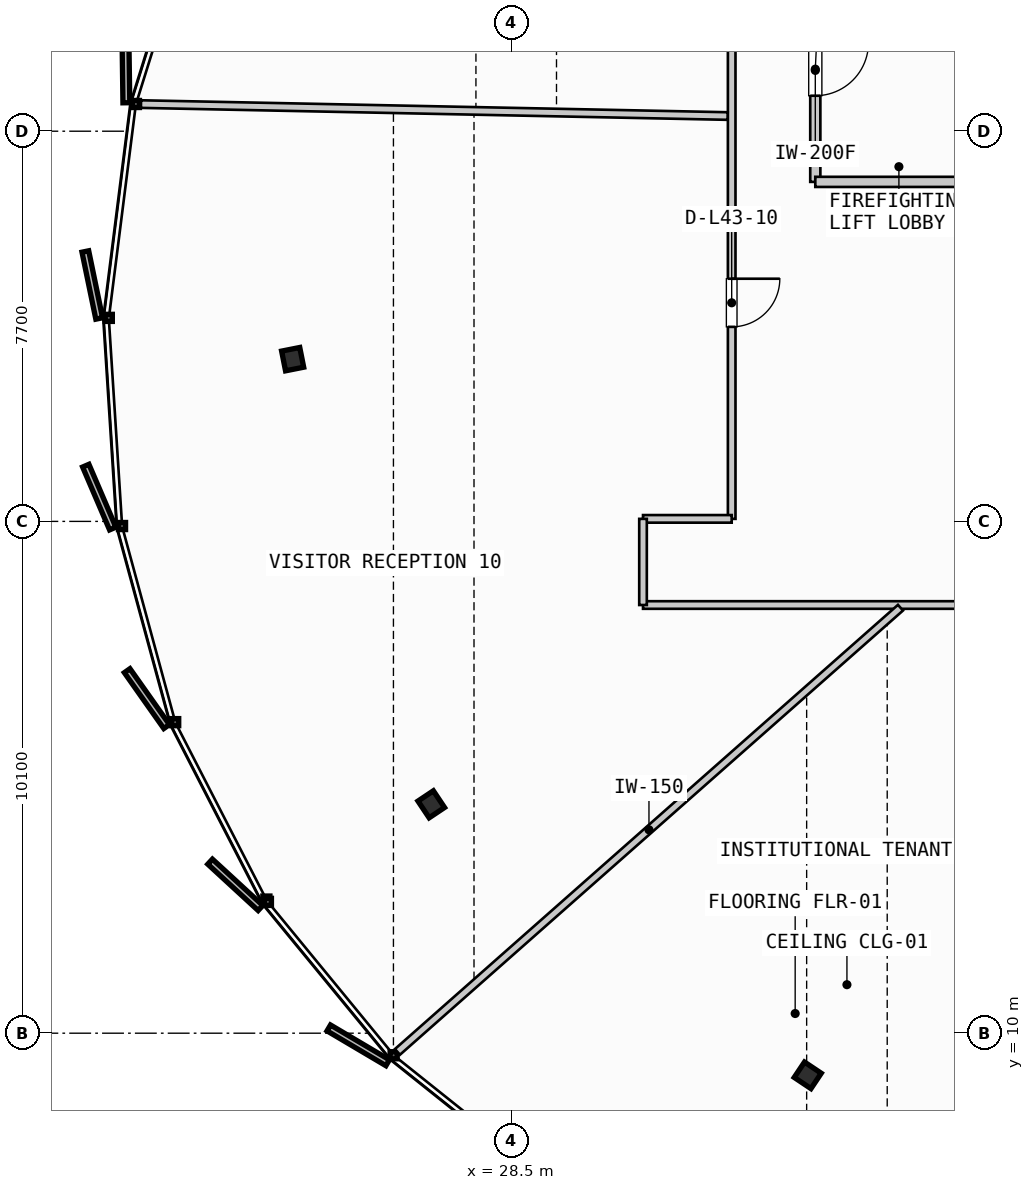
"""IFC4 building model, lengths in metres.
Left out: names, types, materials, properties, quantities, classifications, styles, units other than length and angle.
Written with IfcOpenShell. Run it as: python <this file> out.ifc"""

import sys

from ifc_helpers import new_model, si_unit, direction, frame, frame_2d, origin, origin_2d, place, context, subcontext, project, spatial, rectangle, i_section, extrude, source, transform, mapped, element, fill, save


model = new_model("IFC4")
c1 = context("Model", 3, precision=1e-05, world=origin(), true_north=direction((0.0, 1.0)))
c2 = subcontext(c1, "Body", "Model", "MODEL_VIEW")
j1 = project(units=[si_unit("LENGTHUNIT", "METRE"), si_unit("PLANEANGLEUNIT", "RADIAN")], contexts=[c1])
p1 = place(None, origin())
s1 = spatial("IfcSite", under=j1, at=p1, CompositionType="ELEMENT")
p2 = place(p1, origin())
s2 = spatial("IfcBuilding", under=s1, at=p2, CompositionType="ELEMENT")
p3 = place(p2, frame((0.0, 0.0, 167.85)))
s3 = spatial("IfcBuildingStorey", under=s2, at=p3, CompositionType="ELEMENT", Elevation=167.85)
m1 = source(origin(), c2, "Body", "SweptSolid", [
    extrude(i_section(OverallWidth=0.397, OverallDepth=0.365, WebThickness=0.028, FlangeThickness=0.044, FilletRadius=0.015, at=origin_2d()), origin(), (0.0, 0.0, 1.0), 3.24),
])
for number, where, z_axis, x_axis in (
    (1, (24.185, 23.302, 0.0), (0.0, 0.0, 1.0), (-0.981, -0.195, 0.0)),
    (2, (26.921, 14.517, 0.0), (0.0, 0.0, 1.0), (-0.831, -0.556, 0.0)),
    (3, (34.351, 9.168, 0.0), (0.0, 0.0, 1.0), (-0.556, -0.831, 0.0)),
):
    element("IfcColumn", number, at=place(p3, frame(where, z_axis=z_axis, x_axis=x_axis)), inside=s3, PredefinedType="COLUMN", context=c2, shape_type="MappedRepresentation", body=[
        mapped(m1, transform((0.0, 0.0, 0.0), scale=1.0)),
    ])
p4 = place(p3, frame((34.5, 31.2, 0.0), z_axis=(0.0, 0.0, 1.0), x_axis=(0.0, -1.0, 0.0)))
e4 = element("IfcWall", 4, at=p4, inside=s3, PredefinedType="PARTITIONING", context=c2, shape_type="SweptSolid", body=[
    extrude(rectangle(XDim=4.4, YDim=0.2, at=frame_2d((2.2, 0.0))), origin(), (0.0, 0.0, 1.0), 2.28),
])
p5 = place(p4, frame((1.65, 0.0, 0.0)))
e5 = element("IfcOpeningElement", 5, at=p5, cuts=e4, PredefinedType="OPENING", context=c2, shape_type="SweptSolid", body=[
    extrude(rectangle(XDim=1.05, YDim=2.15, at=frame_2d((0.525, 1.075))), frame((0.0, 0.11, 0.0), z_axis=(0.0, -1.0, 0.0), x_axis=(1.0, 0.0, 0.0)), (0.0, 0.0, 1.0), 0.22),
])
p6 = place(p3, frame((34.5, 26.8, 0.0), z_axis=(0.0, 0.0, 1.0), x_axis=(1.0, 0.0, 0.0)))
e6 = element("IfcWall", 6, at=p6, inside=s3, PredefinedType="PARTITIONING", context=c2, shape_type="SweptSolid", body=[
    extrude(rectangle(XDim=3.215, YDim=0.2, at=frame_2d((1.607, 0.0))), origin(), (0.0, 0.0, 1.0), 2.28),
])
p7 = place(p3, frame((31.1, 18.45, 0.0), z_axis=(0.0, 0.0, 1.0), x_axis=(1.0, 0.0, 0.0)))
e7 = element("IfcWall", 7, at=p7, inside=s3, PredefinedType="PARTITIONING", context=c2, shape_type="SweptSolid", body=[
    extrude(rectangle(XDim=31.4, YDim=0.15, at=frame_2d((15.7, 0.0))), origin(), (0.0, 0.0, 1.0), 2.28),
])
p8 = place(p7, frame((7.969, 0.0, 0.0)))
e8 = element("IfcOpeningElement", 8, at=p8, cuts=e7, PredefinedType="OPENING", context=c2, shape_type="SweptSolid", body=[
    extrude(rectangle(XDim=0.95, YDim=2.15, at=frame_2d((0.475, 1.075))), frame((0.0, 0.085, 0.0), z_axis=(0.0, -1.0, 0.0), x_axis=(1.0, 0.0, 0.0)), (0.0, 0.0, 1.0), 0.17),
])
p9 = place(p7, frame((15.128, 0.0, 0.0)))
e9 = element("IfcOpeningElement", 9, at=p9, cuts=e7, PredefinedType="OPENING", context=c2, shape_type="SweptSolid", body=[
    extrude(rectangle(XDim=0.95, YDim=2.15, at=frame_2d((0.475, 1.075))), frame((0.0, 0.085, 0.0), z_axis=(0.0, -1.0, 0.0), x_axis=(1.0, 0.0, 0.0)), (0.0, 0.0, 1.0), 0.17),
])
p10 = place(p7, frame((21.865, 0.0, 0.0)))
e10 = element("IfcOpeningElement", 10, at=p10, cuts=e7, PredefinedType="OPENING", context=c2, shape_type="SweptSolid", body=[
    extrude(rectangle(XDim=0.95, YDim=2.15, at=frame_2d((0.475, 1.075))), frame((0.0, 0.085, 0.0), z_axis=(0.0, -1.0, 0.0), x_axis=(1.0, 0.0, 0.0)), (0.0, 0.0, 1.0), 0.17),
])
p11 = place(p7, frame((27.555, 0.0, 0.0)))
e11 = element("IfcOpeningElement", 11, at=p11, cuts=e7, PredefinedType="OPENING", context=c2, shape_type="SweptSolid", body=[
    extrude(rectangle(XDim=0.95, YDim=2.15, at=frame_2d((0.475, 1.075))), frame((0.0, 0.085, 0.0), z_axis=(0.0, -1.0, 0.0), x_axis=(1.0, 0.0, 0.0)), (0.0, 0.0, 1.0), 0.17),
])
p12 = place(p3, frame((32.85, 35.45, 0.0), z_axis=(0.0, 0.0, 1.0), x_axis=(0.0, -1.0, 0.0)))
e12 = element("IfcWall", 12, at=p12, inside=s3, PredefinedType="PARTITIONING", context=c2, shape_type="SweptSolid", body=[
    extrude(rectangle(XDim=15.3, YDim=0.15, at=frame_2d((7.65, 0.0))), origin(), (0.0, 0.0, 1.0), 2.28),
])
p13 = place(p12, frame((3.491, 0.0, 0.0)))
e13 = element("IfcOpeningElement", 13, at=p13, cuts=e12, PredefinedType="OPENING", context=c2, shape_type="SweptSolid", body=[
    extrude(rectangle(XDim=0.95, YDim=2.15, at=frame_2d((0.475, 1.075))), frame((0.0, 0.085, 0.0), z_axis=(0.0, -1.0, 0.0), x_axis=(1.0, 0.0, 0.0)), (0.0, 0.0, 1.0), 0.17),
])
p14 = place(p12, frame((10.561, 0.0, 0.0)))
e14 = element("IfcOpeningElement", 14, at=p14, cuts=e12, PredefinedType="OPENING", context=c2, shape_type="SweptSolid", body=[
    extrude(rectangle(XDim=0.95, YDim=2.15, at=frame_2d((0.475, 1.075))), frame((0.0, 0.085, 0.0), z_axis=(0.0, -1.0, 0.0), x_axis=(1.0, 0.0, 0.0)), (0.0, 0.0, 1.0), 0.17),
])
p15 = place(p3, frame((32.85, 20.15, 0.0), z_axis=(0.0, 0.0, 1.0), x_axis=(-1.0, 0.0, 0.0)))
e15 = element("IfcWall", 15, at=p15, inside=s3, PredefinedType="PARTITIONING", context=c2, shape_type="SweptSolid", body=[
    extrude(rectangle(XDim=1.75, YDim=0.15, at=frame_2d((0.875, 0.0))), origin(), (0.0, 0.0, 1.0), 2.28),
])
p16 = place(p3, frame((31.1, 20.15, 0.0), z_axis=(0.0, 0.0, 1.0), x_axis=(0.0, -1.0, 0.0)))
e16 = element("IfcWall", 16, at=p16, inside=s3, PredefinedType="PARTITIONING", context=c2, shape_type="SweptSolid", body=[
    extrude(rectangle(XDim=1.7, YDim=0.15, at=frame_2d((0.85, 0.0))), origin(), (0.0, 0.0, 1.0), 2.28),
])
p17 = place(p3, frame((36.181, 18.397, 0.0), z_axis=(0.0, 0.0, 1.0), x_axis=(-0.74960217034, -0.661888650924, 0.0)))
e17 = element("IfcWall", 17, at=p17, inside=s3, PredefinedType="PARTITIONING", context=c2, shape_type="SweptSolid", body=[
    extrude(rectangle(XDim=13.243, YDim=0.15, at=frame_2d((6.622, 0.0))), origin(), (0.0, 0.0, 1.0), 2.28),
])
p18 = place(p3, frame((42.958, 18.376, 0.0), z_axis=(0.0, 0.0, 1.0), x_axis=(-0.379288441988, -0.925278486605, 0.0)))
e18 = element("IfcWall", 18, at=p18, inside=s3, PredefinedType="PARTITIONING", context=c2, shape_type="SweptSolid", body=[
    extrude(rectangle(XDim=15.441, YDim=0.15, at=frame_2d((7.72, 0.0))), origin(), (0.0, 0.0, 1.0), 2.28),
])
p19 = place(p3, frame((32.77, 28.1, 0.0), z_axis=(0.0, 0.0, 1.0), x_axis=(-0.999792607631, 0.020365208733, 0.0)))
e19 = element("IfcWall", 19, at=p19, inside=s3, PredefinedType="PARTITIONING", context=c2, shape_type="SweptSolid", body=[
    extrude(rectangle(XDim=11.581, YDim=0.15, at=frame_2d((5.79, 0.0))), origin(), (0.0, 0.0, 1.0), 2.28),
])
m2 = source(origin(), c2, "Body", "SweptSolid", [
    extrude(rectangle(XDim=1.05, YDim=2.15, at=frame_2d((0.525, 1.075))), frame((0.0, 0.025, 0.0), z_axis=(0.0, -1.0, 0.0), x_axis=(1.0, 0.0, 0.0)), (0.0, 0.0, 1.0), 0.05),
])
p20 = place(p5, origin())
e20 = element("IfcDoor", 20, at=p20, inside=s3, OperationType="SINGLE_SWING_LEFT", PredefinedType="DOOR", context=c2, shape_type="MappedRepresentation", body=[
    mapped(m2, transform((0.0, 0.0, 0.0), scale=1.0)),
])
fill(e5, e20)
m3 = source(origin(), c2, "Body", "SweptSolid", [
    extrude(rectangle(XDim=0.95, YDim=2.15, at=frame_2d((0.475, 1.075))), frame((0.0, 0.025, 0.0), z_axis=(0.0, -1.0, 0.0), x_axis=(1.0, 0.0, 0.0)), (0.0, 0.0, 1.0), 0.05),
])
p21 = place(p14, origin())
e21 = element("IfcDoor", 21, at=p21, inside=s3, OperationType="SINGLE_SWING_LEFT", PredefinedType="DOOR", context=c2, shape_type="MappedRepresentation", body=[
    mapped(m3, transform((0.0, 0.0, 0.0), scale=1.0)),
])
fill(e14, e21)
save(model, sys.argv[1])
